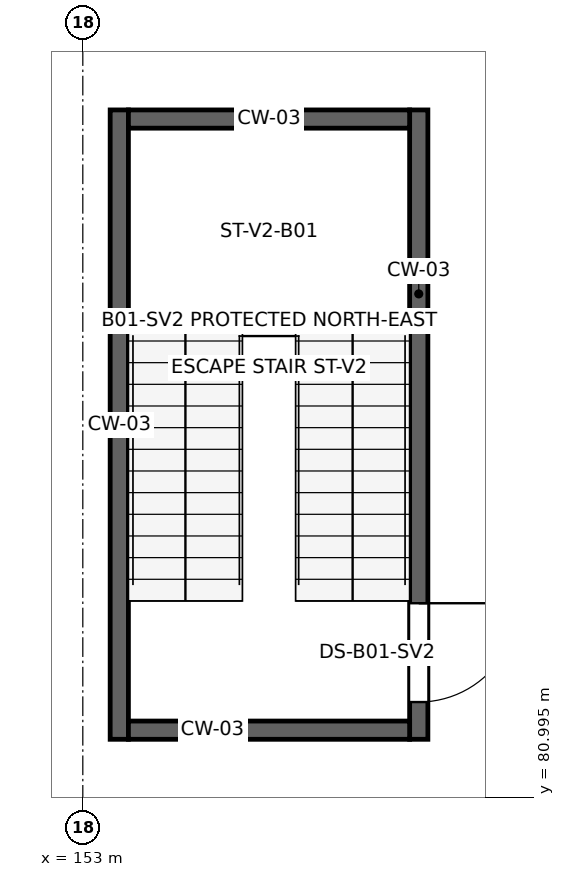
"""IFC4 building model, lengths in metres.
Left out: names, types, materials, properties, quantities, classifications, styles, units other than length and angle.
Written with IfcOpenShell. Run it as: python <this file> out.ifc"""

import sys

from ifc_helpers import new_model, si_unit, direction, frame, frame_2d, origin, place, context, subcontext, project, spatial, rectangle, extrude, element, fill, save


model = new_model("IFC4")
c1 = context("Model", 3, precision=1e-05, world=origin(), true_north=direction((0.0, 1.0)))
c2 = subcontext(c1, "Body", "Model", "MODEL_VIEW")
j1 = project(units=[si_unit("LENGTHUNIT", "METRE"), si_unit("PLANEANGLEUNIT", "RADIAN")], contexts=[c1])
p1 = place(None, origin())
s1 = spatial("IfcSite", under=j1, at=p1, CompositionType="ELEMENT")
p2 = place(p1, origin())
s2 = spatial("IfcBuilding", under=s1, at=p2, CompositionType="ELEMENT")
p3 = place(p2, frame((0.0, 0.0, -4.5)))
s3 = spatial("IfcBuildingStorey", under=s2, at=p3, CompositionType="ELEMENT", Elevation=-4.5)
p4 = place(p3, frame((153.48, 81.76, 0.0), z_axis=(0.0, 0.0, 1.0), x_axis=(0.0, 1.0, 0.0)))
e1 = element("IfcWall", 1, at=p4, inside=s3, PredefinedType="SHEAR", context=c2, shape_type="SweptSolid", body=[
    extrude(rectangle(XDim=8.28, YDim=0.24, at=frame_2d((4.14, 0.0))), origin(), (0.0, 0.0, 1.0), 4.31),
])
p5 = place(p3, frame((157.42, 81.76, 0.0), z_axis=(0.0, 0.0, 1.0), x_axis=(0.0, 1.0, 0.0)))
e2 = element("IfcWall", 2, at=p5, inside=s3, PredefinedType="SHEAR", context=c2, shape_type="SweptSolid", body=[
    extrude(rectangle(XDim=8.28, YDim=0.24, at=frame_2d((4.14, 0.0))), origin(), (0.0, 0.0, 1.0), 4.31),
])
p6 = place(p5, frame((0.49, 0.0, 0.0)))
e3 = element("IfcOpeningElement", 3, at=p6, cuts=e2, PredefinedType="OPENING", context=c2, shape_type="SweptSolid", body=[
    extrude(rectangle(XDim=1.3, YDim=2.2, at=frame_2d((0.65, 1.1))), frame((0.0, 0.135, 0.0), z_axis=(0.0, -1.0, 0.0), x_axis=(1.0, 0.0, 0.0)), (0.0, 0.0, 1.0), 0.27),
])
for number, where, z_axis, x_axis in (
    (4, (153.6, 81.88, 0.0), (0.0, 0.0, 1.0), (1.0, 0.0, 0.0)),
    (5, (153.6, 89.92, 0.0), (0.0, 0.0, 1.0), (1.0, 0.0, 0.0)),
):
    element("IfcWall", number, at=place(p3, frame(where, z_axis=z_axis, x_axis=x_axis)), inside=s3, PredefinedType="SHEAR", context=c2, shape_type="SweptSolid", body=[
        extrude(rectangle(XDim=3.7, YDim=0.24, at=frame_2d((1.85, 0.0))), origin(), (0.0, 0.0, 1.0), 4.31),
    ])
p7 = place(p6, frame((1.3, 0.0, 0.0), z_axis=(0.0, 0.0, 1.0), x_axis=(-1.0, 0.0, 0.0)))
e6 = element("IfcDoor", 6, at=p7, inside=s3, OperationType="SINGLE_SWING_RIGHT", PredefinedType="DOOR", context=c2, shape_type="SweptSolid", body=[
    extrude(rectangle(XDim=1.3, YDim=2.2, at=frame_2d((0.65, 1.1))), frame((0.0, 0.025, 0.0), z_axis=(0.0, -1.0, 0.0), x_axis=(1.0, 0.0, 0.0)), (0.0, 0.0, 1.0), 0.05),
])
fill(e3, e6)
save(model, sys.argv[1])
